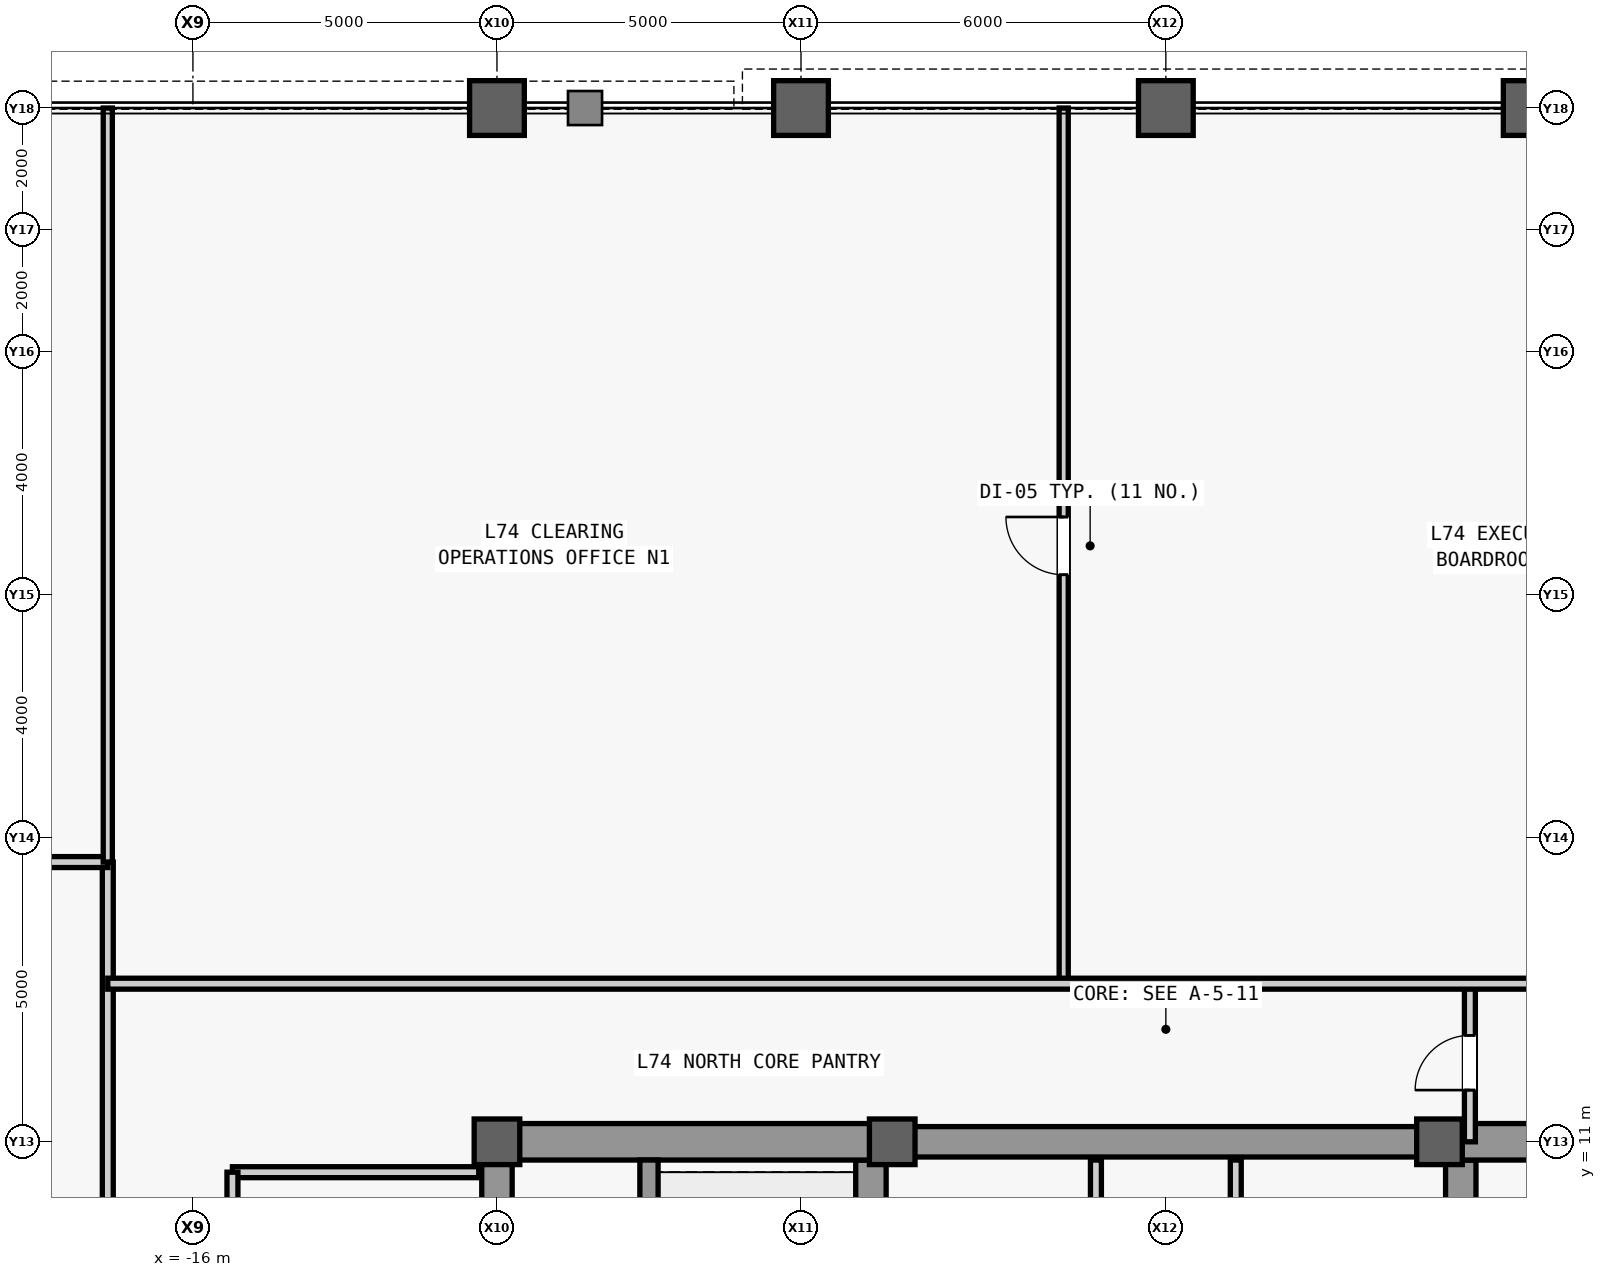
"""IFC4 building model, lengths in metres.
Left out: names, types, materials, properties, quantities, classifications, styles, units other than length and angle.
Written with IfcOpenShell. Run it as: python <this file> out.ifc"""

import sys

from ifc_helpers import new_model, si_unit, direction, frame, frame_2d, origin, origin_2d, place, context, subcontext, project, spatial, rectangle, hollow_rectangle, extrude, source, transform, mapped, element, fill, save


model = new_model("IFC4")
c1 = context("Model", 3, precision=1e-05, world=origin(), true_north=direction((0.0, 1.0)))
c2 = subcontext(c1, "Body", "Model", "MODEL_VIEW")
j1 = project(units=[si_unit("LENGTHUNIT", "METRE"), si_unit("PLANEANGLEUNIT", "RADIAN")], contexts=[c1])
p1 = place(None, origin())
s1 = spatial("IfcSite", under=j1, at=p1, CompositionType="ELEMENT")
p2 = place(p1, origin())
s2 = spatial("IfcBuilding", under=s1, at=p2, CompositionType="ELEMENT")
p3 = place(p2, frame((0.0, 0.0, 313.5)))
s3 = spatial("IfcBuildingStorey", under=s2, at=p3, CompositionType="ELEMENT", Elevation=313.5)
m1 = source(origin(), c2, "Body", "SweptSolid", [
    extrude(rectangle(XDim=22.0, YDim=0.5, at=frame_2d((11.0, 0.0))), origin(), (0.0, 0.0, 1.0), 3.78),
])
p4 = place(p3, frame((-11.0, -11.0, 0.0), z_axis=(0.0, 0.0, 1.0), x_axis=(0.0, 1.0, 0.0)))
e1 = element("IfcWall", 1, at=p4, inside=s3, PredefinedType="SHEAR", context=c2, shape_type="MappedRepresentation", body=[
    mapped(m1, transform((0.0, 0.0, 0.0), scale=1.0)),
])
m2 = source(origin(), c2, "Body", "SweptSolid", [
    extrude(rectangle(XDim=1.1, YDim=2.2, at=frame_2d((0.55, 1.1))), frame((0.0, 0.26, 0.0), z_axis=(0.0, -1.0, 0.0), x_axis=(1.0, 0.0, 0.0)), (0.0, 0.0, 1.0), 0.52),
])
p5 = place(p4, frame((0.8, 0.0, 0.0)))
e2 = element("IfcOpeningElement", 2, at=p5, cuts=e1, PredefinedType="OPENING", context=c2, shape_type="MappedRepresentation", body=[
    mapped(m2, transform((0.0, 0.0, 0.0), scale=1.0)),
])
p6 = place(p4, frame((12.5, 0.0, 0.0)))
e3 = element("IfcOpeningElement", 3, at=p6, cuts=e1, PredefinedType="OPENING", context=c2, shape_type="MappedRepresentation", body=[
    mapped(m2, transform((0.0, 0.0, 0.0), scale=1.0)),
])
m3 = source(origin(), c2, "Body", "SweptSolid", [
    extrude(rectangle(XDim=0.9, YDim=2.15, at=frame_2d((0.45, 1.075))), frame((0.0, 0.26, 0.0), z_axis=(0.0, -1.0, 0.0), x_axis=(1.0, 0.0, 0.0)), (0.0, 0.0, 1.0), 0.52),
])
p7 = place(p4, frame((6.2, 0.0, 0.0)))
e4 = element("IfcOpeningElement", 4, at=p7, cuts=e1, PredefinedType="OPENING", context=c2, shape_type="MappedRepresentation", body=[
    mapped(m3, transform((0.0, 0.0, 0.0), scale=1.0)),
])
p8 = place(p4, frame((8.05, 0.0, 0.0)))
e5 = element("IfcOpeningElement", 5, at=p8, cuts=e1, PredefinedType="OPENING", context=c2, shape_type="MappedRepresentation", body=[
    mapped(m3, transform((0.0, 0.0, 0.0), scale=1.0)),
])
m4 = source(origin(), c2, "Body", "SweptSolid", [
    extrude(rectangle(XDim=1.2, YDim=2.3, at=frame_2d((0.6, 1.15))), frame((0.0, 0.26, 0.0), z_axis=(0.0, -1.0, 0.0), x_axis=(1.0, 0.0, 0.0)), (0.0, 0.0, 1.0), 0.52),
])
p9 = place(p4, frame((14.6, 0.0, 0.0)))
e6 = element("IfcOpeningElement", 6, at=p9, cuts=e1, PredefinedType="OPENING", context=c2, shape_type="MappedRepresentation", body=[
    mapped(m4, transform((0.0, 0.0, 0.0), scale=1.0)),
])
p10 = place(p4, frame((18.2, 0.0, 0.0)))
e7 = element("IfcOpeningElement", 7, at=p10, cuts=e1, PredefinedType="OPENING", context=c2, shape_type="MappedRepresentation", body=[
    mapped(m4, transform((0.0, 0.0, 0.0), scale=1.0)),
])
m5 = source(origin(), c2, "Body", "SweptSolid", [
    extrude(rectangle(XDim=1.3, YDim=2.3, at=frame_2d((0.65, 1.15))), frame((0.0, 0.26, 0.0), z_axis=(0.0, -1.0, 0.0), x_axis=(1.0, 0.0, 0.0)), (0.0, 0.0, 1.0), 0.52),
])
p11 = place(p4, frame((2.7, 0.0, 0.0)))
e8 = element("IfcOpeningElement", 8, at=p11, cuts=e1, PredefinedType="OPENING", context=c2, shape_type="MappedRepresentation", body=[
    mapped(m5, transform((0.0, 0.0, 0.0), scale=1.0)),
])
m6 = source(origin(), c2, "Body", "SweptSolid", [
    extrude(rectangle(XDim=21.4, YDim=0.5, at=frame_2d((10.7, 0.0))), origin(), (0.0, 0.0, 1.0), 3.78),
])
for number, where, z_axis, x_axis in (
    (9, (-4.85, -10.7, 0.0), (0.0, 0.0, 1.0), (0.0, 1.0, 0.0)),
    (10, (4.85, -10.7, 0.0), (0.0, 0.0, 1.0), (0.0, 1.0, 0.0)),
):
    element("IfcWall", number, at=place(p3, frame(where, z_axis=z_axis, x_axis=x_axis)), inside=s3, PredefinedType="SHEAR", context=c2, shape_type="MappedRepresentation", body=[
        mapped(m6, transform((0.0, 0.0, 0.0), scale=1.0)),
    ])
m7 = source(origin(), c2, "Body", "SweptSolid", [
    extrude(rectangle(XDim=5.9, YDim=0.6, at=frame_2d((2.95, 0.0))), origin(), (0.0, 0.0, 1.0), 3.78),
])
p12 = place(p3, frame((-10.75, 11.0, 0.0), z_axis=(0.0, 0.0, 1.0), x_axis=(1.0, 0.0, 0.0)))
e11 = element("IfcWall", 11, at=p12, inside=s3, PredefinedType="SHEAR", context=c2, shape_type="MappedRepresentation", body=[
    mapped(m7, transform((0.0, 0.0, 0.0), scale=1.0)),
])
p13 = place(p3, frame((4.85, 11.0, 0.0), z_axis=(0.0, 0.0, 1.0), x_axis=(1.0, 0.0, 0.0)))
e12 = element("IfcWall", 12, at=p13, inside=s3, PredefinedType="SHEAR", context=c2, shape_type="MappedRepresentation", body=[
    mapped(m7, transform((0.0, 0.0, 0.0), scale=1.0)),
])
m8 = source(origin(), c2, "Body", "SweptSolid", [
    extrude(rectangle(XDim=1.05, YDim=2.2, at=frame_2d((0.525, 1.1))), frame((0.0, 0.31, 0.0), z_axis=(0.0, -1.0, 0.0), x_axis=(1.0, 0.0, 0.0)), (0.0, 0.0, 1.0), 0.62),
])
p14 = place(p13, frame((1.375, 0.0, 0.0)))
e13 = element("IfcOpeningElement", 13, at=p14, cuts=e12, PredefinedType="OPENING", context=c2, shape_type="MappedRepresentation", body=[
    mapped(m8, transform((0.0, 0.0, 0.0), scale=1.0)),
])
m9 = source(origin(), c2, "Body", "SweptSolid", [
    extrude(rectangle(XDim=9.2, YDim=0.5, at=frame_2d((4.6, 0.0))), origin(), (0.0, 0.0, 1.0), 3.78),
])
p15 = place(p3, frame((-4.6, 11.0, 0.0), z_axis=(0.0, 0.0, 1.0), x_axis=(1.0, 0.0, 0.0)))
e14 = element("IfcWall", 14, at=p15, inside=s3, PredefinedType="SHEAR", context=c2, shape_type="MappedRepresentation", body=[
    mapped(m9, transform((0.0, 0.0, 0.0), scale=1.0)),
])
m10 = source(origin(), c2, "Body", "SweptSolid", [
    extrude(rectangle(XDim=0.75, YDim=0.75, at=origin_2d()), origin(), (0.0, 0.0, 1.0), 4.0),
])
p16 = place(p3, frame((-11.0, 11.0, 0.0), z_axis=(0.0, 0.0, 1.0), x_axis=(1.0, 0.0, 0.0)))
e15 = element("IfcColumn", 15, at=p16, inside=s3, PredefinedType="COLUMN", context=c2, shape_type="MappedRepresentation", body=[
    mapped(m10, transform((0.0, 0.0, 0.0), scale=1.0)),
])
m11 = source(origin(), c2, "Body", "SweptSolid", [
    extrude(hollow_rectangle(XDim=0.9, YDim=0.9, WallThickness=0.05, at=origin_2d()), origin(), (0.0, 0.0, 1.0), 4.0),
])
for number, where, z_axis, x_axis in (
    (16, (-11.0, 28.0, 0.0), (0.0, 0.0, 1.0), (1.0, 0.0, 0.0)),
    (17, (-6.0, 28.0, 0.0), (0.0, 0.0, 1.0), (1.0, 0.0, 0.0)),
):
    element("IfcColumn", number, at=place(p3, frame(where, z_axis=z_axis, x_axis=x_axis)), inside=s3, PredefinedType="COLUMN", context=c2, shape_type="MappedRepresentation", body=[
        mapped(m11, transform((0.0, 0.0, 0.0), scale=1.0)),
    ])
p17 = place(p3, frame((-4.5, 11.0, 0.0), z_axis=(0.0, 0.0, 1.0), x_axis=(1.0, 0.0, 0.0)))
e18 = element("IfcColumn", 18, at=p17, inside=s3, PredefinedType="COLUMN", context=c2, shape_type="MappedRepresentation", body=[
    mapped(m10, transform((0.0, 0.0, 0.0), scale=1.0)),
])
p18 = place(p3, frame((0.0, 28.0, 0.0), z_axis=(0.0, 0.0, 1.0), x_axis=(1.0, 0.0, 0.0)))
e19 = element("IfcColumn", 19, at=p18, inside=s3, PredefinedType="COLUMN", context=c2, shape_type="MappedRepresentation", body=[
    mapped(m11, transform((0.0, 0.0, 0.0), scale=1.0)),
])
p19 = place(p3, frame((4.5, 11.0, 0.0), z_axis=(0.0, 0.0, 1.0), x_axis=(1.0, 0.0, 0.0)))
e20 = element("IfcColumn", 20, at=p19, inside=s3, PredefinedType="COLUMN", context=c2, shape_type="MappedRepresentation", body=[
    mapped(m10, transform((0.0, 0.0, 0.0), scale=1.0)),
])
p20 = place(p3, frame((6.0, 28.0, 0.0), z_axis=(0.0, 0.0, 1.0), x_axis=(1.0, 0.0, 0.0)))
e21 = element("IfcColumn", 21, at=p20, inside=s3, PredefinedType="COLUMN", context=c2, shape_type="MappedRepresentation", body=[
    mapped(m11, transform((0.0, 0.0, 0.0), scale=1.0)),
])
m12 = source(origin(), c2, "Body", "SweptSolid", [
    extrude(rectangle(XDim=7.75, YDim=0.3, at=frame_2d((3.875, 0.0))), origin(), (0.0, 0.0, 1.0), 3.78),
])
p21 = place(p3, frame((-8.5, 2.95, 0.0), z_axis=(0.0, 0.0, 1.0), x_axis=(0.0, 1.0, 0.0)))
e22 = element("IfcWall", 22, at=p21, inside=s3, PredefinedType="SHEAR", context=c2, shape_type="MappedRepresentation", body=[
    mapped(m12, transform((0.0, 0.0, 0.0), scale=1.0)),
])
m13 = source(origin(), c2, "Body", "SweptSolid", [
    extrude(rectangle(XDim=4.05, YDim=0.18, at=frame_2d((2.025, 0.0))), origin(), (0.0, 0.0, 1.0), 3.78),
])
p22 = place(p3, frame((-15.35, 10.5, 0.0), z_axis=(0.0, 0.0, 1.0), x_axis=(1.0, 0.0, 0.0)))
e23 = element("IfcWall", 23, at=p22, inside=s3, PredefinedType="PARTITIONING", context=c2, shape_type="MappedRepresentation", body=[
    mapped(m13, transform((0.0, 0.0, 0.0), scale=1.0)),
])
m14 = source(origin(), c2, "Body", "SweptSolid", [
    extrude(rectangle(XDim=16.6, YDim=0.18, at=frame_2d((8.3, 0.0))), origin(), (0.0, 0.0, 1.0), 3.78),
])
p23 = place(p3, frame((-15.35, -6.1, 0.0), z_axis=(0.0, 0.0, 1.0), x_axis=(0.0, 1.0, 0.0)))
e24 = element("IfcWall", 24, at=p23, inside=s3, PredefinedType="PARTITIONING", context=c2, shape_type="MappedRepresentation", body=[
    mapped(m14, transform((0.0, 0.0, 0.0), scale=1.0)),
])
m15 = source(origin(), c2, "Body", "SweptSolid", [
    extrude(rectangle(XDim=1.8, YDim=2.25, at=frame_2d((0.9, 1.125))), frame((0.0, 0.1, 0.0), z_axis=(0.0, -1.0, 0.0), x_axis=(1.0, 0.0, 0.0)), (0.0, 0.0, 1.0), 0.2),
])
p24 = place(p23, frame((2.7, 0.0, 0.0)))
e25 = element("IfcOpeningElement", 25, at=p24, cuts=e24, PredefinedType="OPENING", context=c2, shape_type="MappedRepresentation", body=[
    mapped(m15, transform((0.0, 0.0, 0.0), scale=1.0)),
])
p25 = place(p23, frame((11.0, 0.0, 0.0)))
e26 = element("IfcOpeningElement", 26, at=p25, cuts=e24, PredefinedType="OPENING", context=c2, shape_type="MappedRepresentation", body=[
    mapped(m15, transform((0.0, 0.0, 0.0), scale=1.0)),
])
m16 = source(origin(), c2, "Body", "SweptSolid", [
    extrude(rectangle(XDim=5.4, YDim=0.18, at=frame_2d((2.7, 0.0))), origin(), (0.0, 0.0, 1.0), 3.78),
])
p26 = place(p3, frame((-1.15, 5.3, 0.0), z_axis=(0.0, 0.0, 1.0), x_axis=(0.0, 1.0, 0.0)))
e27 = element("IfcWall", 27, at=p26, inside=s3, PredefinedType="PARTITIONING", context=c2, shape_type="MappedRepresentation", body=[
    mapped(m16, transform((0.0, 0.0, 0.0), scale=1.0)),
])
m17 = source(origin(), c2, "Body", "SweptSolid", [
    extrude(rectangle(XDim=0.9, YDim=2.15, at=frame_2d((0.45, 1.075))), frame((0.0, 0.1, 0.0), z_axis=(0.0, -1.0, 0.0), x_axis=(1.0, 0.0, 0.0)), (0.0, 0.0, 1.0), 0.2),
])
p27 = place(p26, frame((0.9, 0.0, 0.0)))
e28 = element("IfcOpeningElement", 28, at=p27, cuts=e27, PredefinedType="OPENING", context=c2, shape_type="MappedRepresentation", body=[
    mapped(m17, transform((0.0, 0.0, 0.0), scale=1.0)),
])
p28 = place(p26, frame((3.6, 0.0, 0.0)))
e29 = element("IfcOpeningElement", 29, at=p28, cuts=e27, PredefinedType="OPENING", context=c2, shape_type="MappedRepresentation", body=[
    mapped(m17, transform((0.0, 0.0, 0.0), scale=1.0)),
])
p29 = place(p3, frame((1.15, 5.3, 0.0), z_axis=(0.0, 0.0, 1.0), x_axis=(0.0, 1.0, 0.0)))
e30 = element("IfcWall", 30, at=p29, inside=s3, PredefinedType="PARTITIONING", context=c2, shape_type="MappedRepresentation", body=[
    mapped(m16, transform((0.0, 0.0, 0.0), scale=1.0)),
])
p30 = place(p29, frame((2.25, 0.0, 0.0)))
e31 = element("IfcOpeningElement", 31, at=p30, cuts=e30, PredefinedType="OPENING", context=c2, shape_type="MappedRepresentation", body=[
    mapped(m17, transform((0.0, 0.0, 0.0), scale=1.0)),
])
m18 = source(origin(), c2, "Body", "SweptSolid", [
    extrude(rectangle(XDim=8.4, YDim=0.18, at=frame_2d((4.2, 0.0))), origin(), (0.0, 0.0, 1.0), 3.78),
])
p31 = place(p3, frame((-17.4, 7.2, 0.0), z_axis=(0.0, 0.0, 1.0), x_axis=(0.0, 1.0, 0.0)))
e32 = element("IfcWall", 32, at=p31, inside=s3, PredefinedType="PARTITIONING", context=c2, shape_type="MappedRepresentation", body=[
    mapped(m18, transform((0.0, 0.0, 0.0), scale=1.0)),
])
m19 = source(origin(), c2, "Body", "SweptSolid", [
    extrude(rectangle(XDim=2.6, YDim=0.18, at=frame_2d((1.3, 0.0))), origin(), (0.0, 0.0, 1.0), 3.78),
])
p32 = place(p3, frame((5.0, 11.0, 0.0), z_axis=(0.0, 0.0, 1.0), x_axis=(0.0, 1.0, 0.0)))
e33 = element("IfcWall", 33, at=p32, inside=s3, PredefinedType="PARTITIONING", context=c2, shape_type="MappedRepresentation", body=[
    mapped(m19, transform((0.0, 0.0, 0.0), scale=1.0)),
])
p33 = place(p32, frame((0.85, 0.0, 0.0)))
e34 = element("IfcOpeningElement", 34, at=p33, cuts=e33, PredefinedType="OPENING", context=c2, shape_type="MappedRepresentation", body=[
    mapped(m17, transform((0.0, 0.0, 0.0), scale=1.0)),
])
m20 = source(origin(), c2, "Body", "SweptSolid", [
    extrude(rectangle(XDim=2.4, YDim=0.18, at=frame_2d((1.2, 0.0))), origin(), (0.0, 0.0, 1.0), 3.78),
])
p34 = place(p3, frame((-19.8, 15.6, 0.0), z_axis=(0.0, 0.0, 1.0), x_axis=(1.0, 0.0, 0.0)))
e35 = element("IfcWall", 35, at=p34, inside=s3, PredefinedType="PARTITIONING", context=c2, shape_type="MappedRepresentation", body=[
    mapped(m20, transform((0.0, 0.0, 0.0), scale=1.0)),
])
m21 = source(origin(), c2, "Body", "SweptSolid", [
    extrude(rectangle(XDim=14.4, YDim=0.15, at=frame_2d((7.2, 0.0))), origin(), (0.0, 0.0, 1.0), 3.78),
])
p35 = place(p3, frame((-1.68, 13.6, 0.0), z_axis=(0.0, 0.0, 1.0), x_axis=(0.0, 1.0, 0.0)))
e36 = element("IfcWall", 36, at=p35, inside=s3, PredefinedType="PARTITIONING", context=c2, shape_type="MappedRepresentation", body=[
    mapped(m21, transform((0.0, 0.0, 0.0), scale=1.0)),
])
m22 = source(origin(), c2, "Body", "SweptSolid", [
    extrude(rectangle(XDim=0.95, YDim=2.15, at=frame_2d((0.475, 1.075))), frame((0.0, 0.085, 0.0), z_axis=(0.0, -1.0, 0.0), x_axis=(1.0, 0.0, 0.0)), (0.0, 0.0, 1.0), 0.17),
])
p36 = place(p35, frame((6.725, 0.0, 0.0)))
e37 = element("IfcOpeningElement", 37, at=p36, cuts=e36, PredefinedType="OPENING", context=c2, shape_type="MappedRepresentation", body=[
    mapped(m22, transform((0.0, 0.0, 0.0), scale=1.0)),
])
m23 = source(origin(), c2, "Body", "SweptSolid", [
    extrude(rectangle(XDim=32.75, YDim=0.18, at=frame_2d((16.375, 0.0))), origin(), (0.0, 0.0, 1.0), 3.78),
])
p37 = place(p3, frame((-17.4, 13.6, 0.0), z_axis=(0.0, 0.0, 1.0), x_axis=(1.0, 0.0, 0.0)))
e38 = element("IfcWall", 38, at=p37, inside=s3, PredefinedType="PARTITIONING", context=c2, shape_type="MappedRepresentation", body=[
    mapped(m23, transform((0.0, 0.0, 0.0), scale=1.0)),
])
m24 = source(origin(), c2, "Body", "SweptSolid", [
    extrude(rectangle(XDim=1.05, YDim=2.2, at=frame_2d((0.525, 1.1))), frame((0.0, 0.1, 0.0), z_axis=(0.0, -1.0, 0.0), x_axis=(1.0, 0.0, 0.0)), (0.0, 0.0, 1.0), 0.2),
])
p38 = place(p37, frame((27.075, 0.0, 0.0)))
e39 = element("IfcOpeningElement", 39, at=p38, cuts=e38, PredefinedType="OPENING", context=c2, shape_type="MappedRepresentation", body=[
    mapped(m24, transform((0.0, 0.0, 0.0), scale=1.0)),
])
m25 = source(origin(), c2, "Body", "SweptSolid", [
    extrude(rectangle(XDim=12.4, YDim=0.15, at=frame_2d((6.2, 0.0))), origin(), (0.0, 0.0, 1.0), 3.78),
])
p39 = place(p3, frame((-17.4, 15.6, 0.0), z_axis=(0.0, 0.0, 1.0), x_axis=(0.0, 1.0, 0.0)))
e40 = element("IfcWall", 40, at=p39, inside=s3, PredefinedType="PARTITIONING", context=c2, shape_type="MappedRepresentation", body=[
    mapped(m25, transform((0.0, 0.0, 0.0), scale=1.0)),
])
m26 = source(origin(), c2, "Body", "SweptSolid", [
    extrude(rectangle(XDim=0.9, YDim=2.15, at=frame_2d((0.45, 1.075))), frame((0.0, 0.025, 0.0), z_axis=(0.0, -1.0, 0.0), x_axis=(1.0, 0.0, 0.0)), (0.0, 0.0, 1.0), 0.05),
])
p40 = place(p33, origin())
e41 = element("IfcDoor", 41, at=p40, inside=s3, OperationType="SINGLE_SWING_LEFT", PredefinedType="DOOR", context=c2, shape_type="MappedRepresentation", body=[
    mapped(m26, transform((0.0, 0.0, 0.0), scale=1.0)),
])
fill(e34, e41)
m27 = source(origin(), c2, "Body", "SweptSolid", [
    extrude(rectangle(XDim=0.95, YDim=2.15, at=frame_2d((0.475, 1.075))), frame((0.0, 0.025, 0.0), z_axis=(0.0, -1.0, 0.0), x_axis=(1.0, 0.0, 0.0)), (0.0, 0.0, 1.0), 0.05),
])
p41 = place(p36, origin())
e42 = element("IfcDoor", 42, at=p41, inside=s3, OperationType="SINGLE_SWING_RIGHT", PredefinedType="DOOR", context=c2, shape_type="MappedRepresentation", body=[
    mapped(m27, transform((0.0, 0.0, 0.0), scale=1.0)),
])
fill(e37, e42)
save(model, sys.argv[1])
